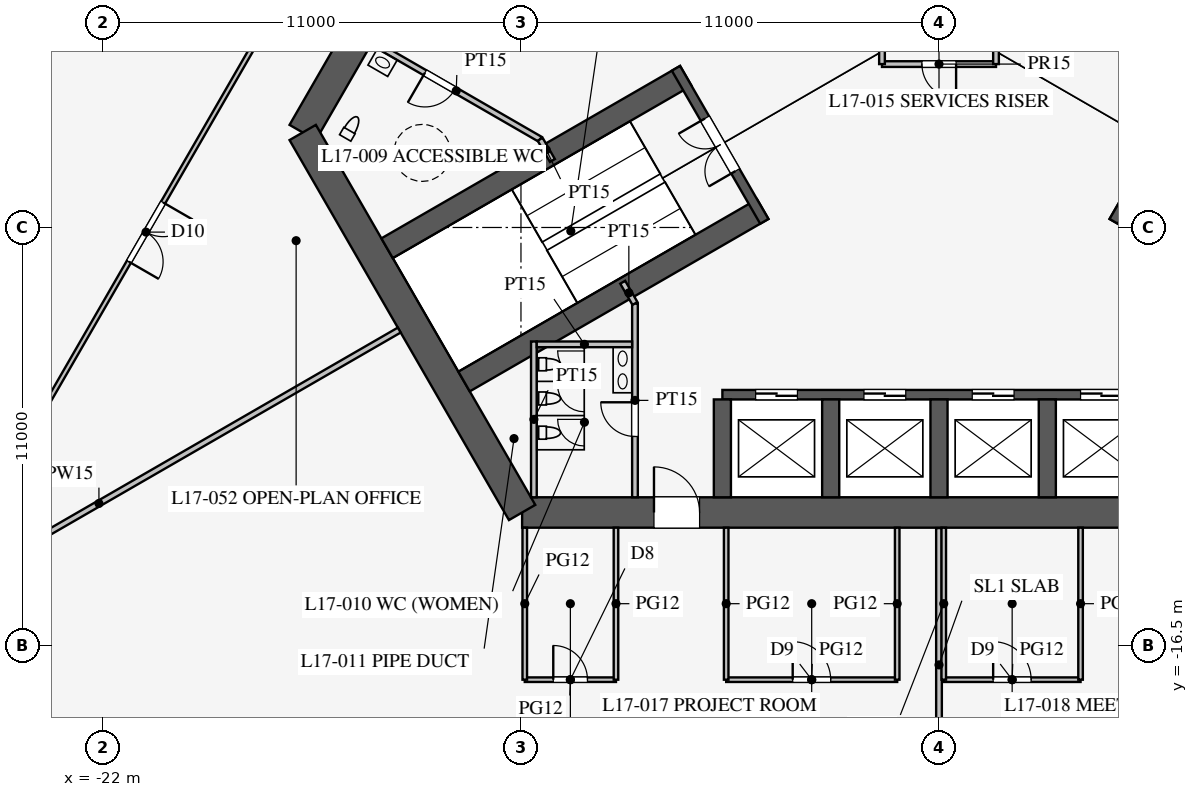
"""IFC4 building model, lengths in metres.
Left out: names, types, materials, properties, quantities, classifications, styles, units other than length and angle.
Written with IfcOpenShell. Run it as: python <this file> out.ifc"""

import sys

from ifc_helpers import new_model, si_unit, direction, frame, frame_2d, origin, place, context, subcontext, project, spatial, rectangle, extrude, element, fill, save


model = new_model("IFC4")
c1 = context("Model", 3, precision=1e-05, world=origin(), true_north=direction((0.0, 1.0)))
c2 = subcontext(c1, "Body", "Model", "MODEL_VIEW")
j1 = project(units=[si_unit("LENGTHUNIT", "METRE"), si_unit("PLANEANGLEUNIT", "RADIAN")], contexts=[c1])
p1 = place(None, origin())
s1 = spatial("IfcSite", under=j1, at=p1, CompositionType="ELEMENT")
p2 = place(p1, origin())
s2 = spatial("IfcBuilding", under=s1, at=p2, CompositionType="ELEMENT")
p3 = place(p2, frame((0.0, 0.0, 75.3)))
s3 = spatial("IfcBuildingStorey", under=s2, at=p3, CompositionType="ELEMENT", Elevation=75.3)
p4 = place(p3, frame((-10.97, -13.0, 0.0), z_axis=(0.0, 0.0, 1.0), x_axis=(1.0, 0.0, 0.0)))
e1 = element("IfcWall", 1, at=p4, inside=s3, PredefinedType="SHEAR", context=c2, shape_type="SweptSolid", body=[
    extrude(rectangle(XDim=21.939, YDim=0.8, at=frame_2d((10.97, 0.0))), origin(), (0.0, 0.0, 1.0), 4.2),
])
p5 = place(p4, frame((17.27, 0.0, 0.0)))
e2 = element("IfcOpeningElement", 2, at=p5, cuts=e1, PredefinedType="OPENING", context=c2, shape_type="SweptSolid", body=[
    extrude(rectangle(XDim=1.2, YDim=2.1, at=frame_2d((0.6, 1.05))), frame((0.0, 0.41, 0.0), z_axis=(0.0, -1.0, 0.0), x_axis=(1.0, 0.0, 0.0)), (0.0, 0.0, 1.0), 0.82),
])
p6 = place(p4, frame((3.47, 0.0, 0.0)))
e3 = element("IfcOpeningElement", 3, at=p6, cuts=e1, PredefinedType="OPENING", context=c2, shape_type="SweptSolid", body=[
    extrude(rectangle(XDim=1.2, YDim=2.1, at=frame_2d((0.6, 1.05))), frame((0.0, 0.41, 0.0), z_axis=(0.0, -1.0, 0.0), x_axis=(1.0, 0.0, 0.0)), (0.0, 0.0, 1.0), 0.82),
])
p7 = place(p3, frame((-5.773, 16.0, 0.0), z_axis=(0.0, 0.0, 1.0), x_axis=(-0.500002442456, -0.866023993627, 0.0)))
e4 = element("IfcWall", 4, at=p7, inside=s3, PredefinedType="SHEAR", context=c2, shape_type="SweptSolid", body=[
    extrude(rectangle(XDim=21.939, YDim=0.8, at=frame_2d((10.97, 0.0))), origin(), (0.0, 0.0, 1.0), 4.2),
])
p8 = place(p7, frame((17.27, 0.0, 0.0)))
e5 = element("IfcOpeningElement", 5, at=p8, cuts=e4, PredefinedType="OPENING", context=c2, shape_type="SweptSolid", body=[
    extrude(rectangle(XDim=1.2, YDim=2.1, at=frame_2d((0.6, 1.05))), frame((0.0, 0.41, 0.0), z_axis=(0.0, -1.0, 0.0), x_axis=(1.0, 0.0, 0.0)), (0.0, 0.0, 1.0), 0.82),
])
p9 = place(p7, frame((3.47, 0.0, 0.0)))
e6 = element("IfcOpeningElement", 6, at=p9, cuts=e4, PredefinedType="OPENING", context=c2, shape_type="SweptSolid", body=[
    extrude(rectangle(XDim=1.2, YDim=2.1, at=frame_2d((0.6, 1.05))), frame((0.0, 0.41, 0.0), z_axis=(0.0, -1.0, 0.0), x_axis=(1.0, 0.0, 0.0)), (0.0, 0.0, 1.0), 0.82),
])
p10 = place(p3, frame((-16.743, -3.0, 0.0), z_axis=(0.0, 0.0, 1.0), x_axis=(0.499995765644, -0.866027848477, 0.0)))
e7 = element("IfcWall", 7, at=p10, inside=s3, PredefinedType="SHEAR", context=c2, shape_type="SweptSolid", body=[
    extrude(rectangle(XDim=11.547, YDim=0.8, at=frame_2d((5.773, 0.0))), origin(), (0.0, 0.0, 1.0), 4.2),
])
p11 = place(p3, frame((-5.7, -9.9, 0.0), z_axis=(0.0, 0.0, 1.0), x_axis=(1.0, 0.0, 0.0)))
e8 = element("IfcWall", 8, at=p11, inside=s3, PredefinedType="SHEAR", context=c2, shape_type="SweptSolid", body=[
    extrude(rectangle(XDim=11.4, YDim=0.25, at=frame_2d((5.7, 0.0))), origin(), (0.0, 0.0, 1.0), 4.2),
])
p12 = place(p11, frame((0.875, 0.0, 0.0)))
e9 = element("IfcOpeningElement", 9, at=p12, cuts=e8, PredefinedType="OPENING", context=c2, shape_type="SweptSolid", body=[
    extrude(rectangle(XDim=1.1, YDim=2.2, at=frame_2d((0.55, 1.1))), frame((0.0, 0.135, 0.0), z_axis=(0.0, -1.0, 0.0), x_axis=(1.0, 0.0, 0.0)), (0.0, 0.0, 1.0), 0.27),
])
p13 = place(p11, frame((3.725, 0.0, 0.0)))
e10 = element("IfcOpeningElement", 10, at=p13, cuts=e8, PredefinedType="OPENING", context=c2, shape_type="SweptSolid", body=[
    extrude(rectangle(XDim=1.1, YDim=2.2, at=frame_2d((0.55, 1.1))), frame((0.0, 0.135, 0.0), z_axis=(0.0, -1.0, 0.0), x_axis=(1.0, 0.0, 0.0)), (0.0, 0.0, 1.0), 0.27),
])
p14 = place(p11, frame((6.575, 0.0, 0.0)))
e11 = element("IfcOpeningElement", 11, at=p14, cuts=e8, PredefinedType="OPENING", context=c2, shape_type="SweptSolid", body=[
    extrude(rectangle(XDim=1.1, YDim=2.2, at=frame_2d((0.55, 1.1))), frame((0.0, 0.135, 0.0), z_axis=(0.0, -1.0, 0.0), x_axis=(1.0, 0.0, 0.0)), (0.0, 0.0, 1.0), 0.27),
])
p15 = place(p11, frame((9.425, 0.0, 0.0)))
e12 = element("IfcOpeningElement", 12, at=p15, cuts=e8, PredefinedType="OPENING", context=c2, shape_type="SweptSolid", body=[
    extrude(rectangle(XDim=1.1, YDim=2.2, at=frame_2d((0.55, 1.1))), frame((0.0, 0.135, 0.0), z_axis=(0.0, -1.0, 0.0), x_axis=(1.0, 0.0, 0.0)), (0.0, 0.0, 1.0), 0.27),
])
for number, where, z_axis, x_axis in (
    (13, (-5.7, -10.025, 0.0), (0.0, 0.0, 1.0), (0.0, -1.0, 0.0)),
    (14, (-2.85, -10.025, 0.0), (0.0, 0.0, 1.0), (0.0, -1.0, 0.0)),
    (15, (0.0, -10.025, 0.0), (0.0, 0.0, 1.0), (0.0, -1.0, 0.0)),
    (16, (2.85, -10.025, 0.0), (0.0, 0.0, 1.0), (0.0, -1.0, 0.0)),
):
    element("IfcWall", number, at=place(p3, frame(where, z_axis=z_axis, x_axis=x_axis)), inside=s3, PredefinedType="SHEAR", context=c2, shape_type="SweptSolid", body=[
        extrude(rectangle(XDim=2.575, YDim=0.45, at=frame_2d((1.288, 0.0))), origin(), (0.0, 0.0, 1.0), 4.2),
    ])
p16 = place(p3, frame((4.638, -5.016, 0.0), z_axis=(0.0, 0.0, 1.0), x_axis=(0.866019375473, -0.500010441196, 0.0)))
e17 = element("IfcWall", 17, at=p16, inside=s3, PredefinedType="SHEAR", context=c2, shape_type="SweptSolid", body=[
    extrude(rectangle(XDim=9.075, YDim=0.6, at=frame_2d((4.538, 0.0))), origin(), (0.0, 0.0, 1.0), 4.2),
])
p17 = place(p3, frame((4.597, -5.339, 0.0), z_axis=(0.0, 0.0, 1.0), x_axis=(0.499984536904, 0.866034331223, 0.0)))
e18 = element("IfcWall", 18, at=p17, inside=s3, PredefinedType="SHEAR", context=c2, shape_type="SweptSolid", body=[
    extrude(rectangle(XDim=4.65, YDim=0.25, at=frame_2d((2.325, 0.0))), origin(), (0.0, 0.0, 1.0), 4.2),
])
p18 = place(p17, frame((1.525, 0.0, 0.0)))
e19 = element("IfcOpeningElement", 19, at=p18, cuts=e18, PredefinedType="OPENING", context=c2, shape_type="SweptSolid", body=[
    extrude(rectangle(XDim=1.6, YDim=2.1, at=frame_2d((0.8, 1.05))), frame((0.0, 0.135, 0.0), z_axis=(0.0, -1.0, 0.0), x_axis=(1.0, 0.0, 0.0)), (0.0, 0.0, 1.0), 0.27),
])
for number, where, z_axis, x_axis in (
    (20, (-6.663, -1.509, 0.0), (0.0, 0.0, 1.0), (-0.866, -0.5, 0.0)),
    (21, (-4.638, -5.016, 0.0), (0.0, 0.0, 1.0), (-0.866, -0.5, 0.0)),
):
    element("IfcWall", number, at=place(p3, frame(where, z_axis=z_axis, x_axis=x_axis)), inside=s3, PredefinedType="SHEAR", context=c2, shape_type="SweptSolid", body=[
        extrude(rectangle(XDim=9.075, YDim=0.6, at=frame_2d((4.538, 0.0))), origin(), (0.0, 0.0, 1.0), 4.2),
    ])
p19 = place(p3, frame((-6.922, -1.312, 0.0), z_axis=(0.0, 0.0, 1.0), x_axis=(0.499984536904, -0.866034331223, 0.0)))
e22 = element("IfcWall", 22, at=p19, inside=s3, PredefinedType="SHEAR", context=c2, shape_type="SweptSolid", body=[
    extrude(rectangle(XDim=4.65, YDim=0.25, at=frame_2d((2.325, 0.0))), origin(), (0.0, 0.0, 1.0), 4.2),
])
p20 = place(p19, frame((1.525, 0.0, 0.0)))
e23 = element("IfcOpeningElement", 23, at=p20, cuts=e22, PredefinedType="OPENING", context=c2, shape_type="SweptSolid", body=[
    extrude(rectangle(XDim=1.6, YDim=2.1, at=frame_2d((0.8, 1.05))), frame((0.0, 0.135, 0.0), z_axis=(0.0, -1.0, 0.0), x_axis=(1.0, 0.0, 0.0)), (0.0, 0.0, 1.0), 0.27),
])
p21 = place(p3, frame((-8.0, -7.5, 0.0), z_axis=(0.0, 0.0, 1.0), x_axis=(0.0, -1.0, 0.0)))
e24 = element("IfcWall", 24, at=p21, inside=s3, PredefinedType="PARTITIONING", context=c2, shape_type="SweptSolid", body=[
    extrude(rectangle(XDim=5.1, YDim=0.15, at=frame_2d((2.55, 0.0))), origin(), (0.0, 0.0, 1.0), 4.0),
])
p22 = place(p21, frame((2.6, 0.0, 0.0)))
e25 = element("IfcOpeningElement", 25, at=p22, cuts=e24, PredefinedType="OPENING", context=c2, shape_type="SweptSolid", body=[
    extrude(rectangle(XDim=0.9, YDim=2.1, at=frame_2d((0.45, 1.05))), frame((0.0, 0.085, 0.0), z_axis=(0.0, -1.0, 0.0), x_axis=(1.0, 0.0, 0.0)), (0.0, 0.0, 1.0), 0.17),
])
p23 = place(p3, frame((-10.495, -3.178, 0.0), z_axis=(0.0, 0.0, 1.0), x_axis=(-0.86602216432, 0.500005610874, 0.0)))
e26 = element("IfcWall", 26, at=p23, inside=s3, PredefinedType="PARTITIONING", context=c2, shape_type="SweptSolid", body=[
    extrude(rectangle(XDim=5.1, YDim=0.15, at=frame_2d((2.55, 0.0))), origin(), (0.0, 0.0, 1.0), 4.0),
])
p24 = place(p23, frame((2.6, 0.0, 0.0)))
e27 = element("IfcOpeningElement", 27, at=p24, cuts=e26, PredefinedType="OPENING", context=c2, shape_type="SweptSolid", body=[
    extrude(rectangle(XDim=0.9, YDim=2.1, at=frame_2d((0.45, 1.05))), frame((0.0, 0.085, 0.0), z_axis=(0.0, -1.0, 0.0), x_axis=(1.0, 0.0, 0.0)), (0.0, 0.0, 1.0), 0.17),
])
for number, where, z_axis, x_axis in (
    (28, (-10.495, -3.178, 0.0), (0.0, 0.0, 1.0), (0.5, -0.866, 0.0)),
    (29, (-8.0, -7.5, 0.0), (0.0, 0.0, 1.0), (-0.5, 0.866, 0.0)),
):
    element("IfcWall", number, at=place(p3, frame(where, z_axis=z_axis, x_axis=x_axis)), inside=s3, PredefinedType="PARTITIONING", context=c2, shape_type="SweptSolid", body=[
        extrude(rectangle(XDim=0.645, YDim=0.15, at=frame_2d((0.323, 0.0))), origin(), (0.0, 0.0, 1.0), 4.0),
    ])
p25 = place(p3, frame((-10.66, -8.5, 0.0), z_axis=(0.0, 0.0, 1.0), x_axis=(0.0, -1.0, 0.0)))
e30 = element("IfcWall", 30, at=p25, inside=s3, PredefinedType="PARTITIONING", context=c2, shape_type="SweptSolid", body=[
    extrude(rectangle(XDim=4.1, YDim=0.15, at=frame_2d((2.05, 0.0))), origin(), (0.0, 0.0, 1.0), 4.0),
])
p26 = place(p3, frame((-8.075, -8.575, 0.0), z_axis=(0.0, 0.0, 1.0), x_axis=(-1.0, 0.0, 0.0)))
e31 = element("IfcWall", 31, at=p26, inside=s3, PredefinedType="PARTITIONING", context=c2, shape_type="SweptSolid", body=[
    extrude(rectangle(XDim=2.51, YDim=0.15, at=frame_2d((1.255, 0.0))), origin(), (0.0, 0.0, 1.0), 4.0),
])
p27 = place(p3, frame((-1.5, -1.2, 0.0), z_axis=(0.0, 0.0, 1.0), x_axis=(1.0, 0.0, 0.0)))
e32 = element("IfcWall", 32, at=p27, inside=s3, PredefinedType="PARTITIONING", context=c2, shape_type="SweptSolid", body=[
    extrude(rectangle(XDim=3.0, YDim=0.15, at=frame_2d((1.5, 0.0))), origin(), (0.0, 0.0, 1.0), 4.0),
])
p28 = place(p27, frame((1.05, 0.0, 0.0)))
e33 = element("IfcOpeningElement", 33, at=p28, cuts=e32, PredefinedType="OPENING", context=c2, shape_type="SweptSolid", body=[
    extrude(rectangle(XDim=0.9, YDim=2.1, at=frame_2d((0.45, 1.05))), frame((0.0, 0.085, 0.0), z_axis=(0.0, -1.0, 0.0), x_axis=(1.0, 0.0, 0.0)), (0.0, 0.0, 1.0), 0.17),
])
for number, where, z_axis, x_axis in (
    (34, (1.5, -1.2, 0.0), (0.0, 0.0, 1.0), (0.0, 1.0, 0.0)),
    (35, (-1.5, 1.2, 0.0), (0.0, 0.0, 1.0), (0.0, -1.0, 0.0)),
):
    element("IfcWall", number, at=place(p3, frame(where, z_axis=z_axis, x_axis=x_axis)), inside=s3, PredefinedType="PARTITIONING", context=c2, shape_type="SweptSolid", body=[
        extrude(rectangle(XDim=2.4, YDim=0.15, at=frame_2d((1.2, 0.0))), origin(), (0.0, 0.0, 1.0), 4.0),
    ])
p29 = place(p3, frame((-14.203, -8.2, 0.0), z_axis=(0.0, 0.0, 1.0), x_axis=(-0.866024965723, -0.500000758745, 0.0)))
e36 = element("IfcWall", 36, at=p29, inside=s3, PredefinedType="PARTITIONING", context=c2, shape_type="SweptSolid", body=[
    extrude(rectangle(XDim=18.25, YDim=0.15, at=frame_2d((9.125, 0.0))), origin(), (0.0, 0.0, 1.0), 2.3),
])
p30 = place(p3, frame((0.0, -13.41, 0.0), z_axis=(0.0, 0.0, 1.0), x_axis=(0.0, -1.0, 0.0)))
e37 = element("IfcWall", 37, at=p30, inside=s3, PredefinedType="PARTITIONING", context=c2, shape_type="SweptSolid", body=[
    extrude(rectangle(XDim=12.709, YDim=0.15, at=frame_2d((6.354, 0.0))), origin(), (0.0, 0.0, 1.0), 2.8),
])
p31 = place(p3, frame((0.125, -17.4, 0.0), z_axis=(0.0, 0.0, 1.0), x_axis=(1.0, 0.0, 0.0)))
e38 = element("IfcWall", 38, at=p31, inside=s3, PredefinedType="PARTITIONING", context=c2, shape_type="SweptSolid", body=[
    extrude(rectangle(XDim=3.6, YDim=0.12, at=frame_2d((1.8, 0.0))), origin(), (0.0, 0.0, 1.0), 2.9),
])
p32 = place(p31, frame((1.3, 0.0, 0.15)))
e39 = element("IfcOpeningElement", 39, at=p32, cuts=e38, PredefinedType="OPENING", context=c2, shape_type="SweptSolid", body=[
    extrude(rectangle(XDim=1.0, YDim=2.1, at=frame_2d((0.5, 1.05))), frame((0.0, 0.07, 0.0), z_axis=(0.0, -1.0, 0.0), x_axis=(1.0, 0.0, 0.0)), (0.0, 0.0, 1.0), 0.14),
])
p33 = place(p3, frame((-10.9, -17.4, 0.0), z_axis=(0.0, 0.0, 1.0), x_axis=(1.0, 0.0, 0.0)))
e40 = element("IfcWall", 40, at=p33, inside=s3, PredefinedType="PARTITIONING", context=c2, shape_type="SweptSolid", body=[
    extrude(rectangle(XDim=2.4, YDim=0.12, at=frame_2d((1.2, 0.0))), origin(), (0.0, 0.0, 1.0), 2.9),
])
p34 = place(p33, frame((0.75, 0.0, 0.15)))
e41 = element("IfcOpeningElement", 41, at=p34, cuts=e40, PredefinedType="OPENING", context=c2, shape_type="SweptSolid", body=[
    extrude(rectangle(XDim=0.9, YDim=2.1, at=frame_2d((0.45, 1.05))), frame((0.0, 0.07, 0.0), z_axis=(0.0, -1.0, 0.0), x_axis=(1.0, 0.0, 0.0)), (0.0, 0.0, 1.0), 0.14),
])
p35 = place(p3, frame((-5.6, -17.4, 0.0), z_axis=(0.0, 0.0, 1.0), x_axis=(1.0, 0.0, 0.0)))
e42 = element("IfcWall", 42, at=p35, inside=s3, PredefinedType="PARTITIONING", context=c2, shape_type="SweptSolid", body=[
    extrude(rectangle(XDim=4.5, YDim=0.12, at=frame_2d((2.25, 0.0))), origin(), (0.0, 0.0, 1.0), 2.9),
])
p36 = place(p35, frame((1.75, 0.0, 0.15)))
e43 = element("IfcOpeningElement", 43, at=p36, cuts=e42, PredefinedType="OPENING", context=c2, shape_type="SweptSolid", body=[
    extrude(rectangle(XDim=1.0, YDim=2.1, at=frame_2d((0.5, 1.05))), frame((0.0, 0.07, 0.0), z_axis=(0.0, -1.0, 0.0), x_axis=(1.0, 0.0, 0.0)), (0.0, 0.0, 1.0), 0.14),
])
p37 = place(p3, frame((0.125, -13.4, 0.0), z_axis=(0.0, 0.0, 1.0), x_axis=(0.0, -1.0, 0.0)))
e44 = element("IfcWall", 44, at=p37, inside=s3, PredefinedType="PARTITIONING", context=c2, shape_type="SweptSolid", body=[
    extrude(rectangle(XDim=4.0, YDim=0.12, at=frame_2d((2.0, 0.0))), origin(), (0.0, 0.0, 1.0), 2.8),
])
for number, where, z_axis, x_axis in (
    (45, (3.725, -13.4, 0.0), (0.0, 0.0, 1.0), (0.0, -1.0, 0.0)),
    (46, (-1.1, -13.4, 0.0), (0.0, 0.0, 1.0), (0.0, -1.0, 0.0)),
    (47, (-10.9, -13.4, 0.0), (0.0, 0.0, 1.0), (0.0, -1.0, 0.0)),
    (48, (-5.6, -13.4, 0.0), (0.0, 0.0, 1.0), (0.0, -1.0, 0.0)),
    (49, (-8.5, -13.4, 0.0), (0.0, 0.0, 1.0), (0.0, -1.0, 0.0)),
):
    element("IfcWall", number, at=place(p3, frame(where, z_axis=z_axis, x_axis=x_axis)), inside=s3, PredefinedType="PARTITIONING", context=c2, shape_type="SweptSolid", body=[
        extrude(rectangle(XDim=4.0, YDim=0.12, at=frame_2d((2.0, 0.0))), origin(), (0.0, 0.0, 1.0), 2.9),
    ])
p38 = place(p3, frame((26.415, -15.231, 0.0), z_axis=(0.0, 0.0, 1.0), x_axis=(-0.50000091641, 0.866024874695, 0.0)))
e50 = element("IfcWall", 50, at=p38, inside=s3, PredefinedType="PARTITIONING", context=c2, shape_type="SweptSolid", body=[
    extrude(rectangle(XDim=52.796, YDim=0.12, at=frame_2d((26.398, 0.0))), origin(), (0.0, 0.0, 1.0), 2.9),
])
p39 = place(p38, frame((10.2, 0.0, 0.15)))
e51 = element("IfcOpeningElement", 51, at=p39, cuts=e50, PredefinedType="OPENING", context=c2, shape_type="SweptSolid", body=[
    extrude(rectangle(XDim=1.8, YDim=2.1, at=frame_2d((0.9, 1.05))), frame((0.0, 0.07, 0.0), z_axis=(0.0, -1.0, 0.0), x_axis=(1.0, 0.0, 0.0)), (0.0, 0.0, 1.0), 0.14),
])
p40 = place(p38, frame((40.8, 0.0, 0.15)))
e52 = element("IfcOpeningElement", 52, at=p40, cuts=e50, PredefinedType="OPENING", context=c2, shape_type="SweptSolid", body=[
    extrude(rectangle(XDim=1.8, YDim=2.1, at=frame_2d((0.9, 1.05))), frame((0.0, 0.07, 0.0), z_axis=(0.0, -1.0, 0.0), x_axis=(1.0, 0.0, 0.0)), (0.0, 0.0, 1.0), 0.14),
])
p41 = place(p3, frame((-0.016, 30.491, 0.0), z_axis=(0.0, 0.0, 1.0), x_axis=(-0.50000091641, -0.866024874695, 0.0)))
e53 = element("IfcWall", 53, at=p41, inside=s3, PredefinedType="PARTITIONING", context=c2, shape_type="SweptSolid", body=[
    extrude(rectangle(XDim=52.796, YDim=0.12, at=frame_2d((26.398, 0.0))), origin(), (0.0, 0.0, 1.0), 2.9),
])
p42 = place(p41, frame((10.2, 0.0, 0.15)))
e54 = element("IfcOpeningElement", 54, at=p42, cuts=e53, PredefinedType="OPENING", context=c2, shape_type="SweptSolid", body=[
    extrude(rectangle(XDim=1.8, YDim=2.1, at=frame_2d((0.9, 1.05))), frame((0.0, 0.07, 0.0), z_axis=(0.0, -1.0, 0.0), x_axis=(1.0, 0.0, 0.0)), (0.0, 0.0, 1.0), 0.14),
])
p43 = place(p41, frame((40.8, 0.0, 0.15)))
e55 = element("IfcOpeningElement", 55, at=p43, cuts=e53, PredefinedType="OPENING", context=c2, shape_type="SweptSolid", body=[
    extrude(rectangle(XDim=1.8, YDim=2.1, at=frame_2d((0.9, 1.05))), frame((0.0, 0.07, 0.0), z_axis=(0.0, -1.0, 0.0), x_axis=(1.0, 0.0, 0.0)), (0.0, 0.0, 1.0), 0.14),
])
p44 = place(p22, frame((0.9, 0.0, 0.0), z_axis=(0.0, 0.0, 1.0), x_axis=(-1.0, 0.0, 0.0)))
e56 = element("IfcDoor", 56, at=p44, inside=s3, OperationType="SINGLE_SWING_RIGHT", PredefinedType="DOOR", context=c2, shape_type="SweptSolid", body=[
    extrude(rectangle(XDim=0.9, YDim=2.1, at=frame_2d((0.45, 1.05))), frame((0.0, 0.025, 0.0), z_axis=(0.0, -1.0, 0.0), x_axis=(1.0, 0.0, 0.0)), (0.0, 0.0, 1.0), 0.05),
])
fill(e25, e56)
p45 = place(p24, origin())
e57 = element("IfcDoor", 57, at=p45, inside=s3, OperationType="SINGLE_SWING_RIGHT", PredefinedType="DOOR", context=c2, shape_type="SweptSolid", body=[
    extrude(rectangle(XDim=0.9, YDim=2.1, at=frame_2d((0.45, 1.05))), frame((0.0, 0.025, 0.0), z_axis=(0.0, -1.0, 0.0), x_axis=(1.0, 0.0, 0.0)), (0.0, 0.0, 1.0), 0.05),
])
fill(e27, e57)
p46 = place(p28, frame((0.9, 0.0, 0.0), z_axis=(0.0, 0.0, 1.0), x_axis=(-1.0, 0.0, 0.0)))
e58 = element("IfcDoor", 58, at=p46, inside=s3, OperationType="SINGLE_SWING_LEFT", PredefinedType="DOOR", context=c2, shape_type="SweptSolid", body=[
    extrude(rectangle(XDim=0.9, YDim=2.1, at=frame_2d((0.45, 1.05))), frame((0.0, 0.025, 0.0), z_axis=(0.0, -1.0, 0.0), x_axis=(1.0, 0.0, 0.0)), (0.0, 0.0, 1.0), 0.05),
])
fill(e33, e58)
p47 = place(p20, frame((1.6, 0.0, 0.0), z_axis=(0.0, 0.0, 1.0), x_axis=(-1.0, 0.0, 0.0)))
e59 = element("IfcDoor", 59, at=p47, inside=s3, OperationType="DOUBLE_DOOR_SINGLE_SWING", PredefinedType="DOOR", context=c2, shape_type="SweptSolid", body=[
    extrude(rectangle(XDim=1.6, YDim=2.1, at=frame_2d((0.8, 1.05))), frame((0.0, 0.025, 0.0), z_axis=(0.0, -1.0, 0.0), x_axis=(1.0, 0.0, 0.0)), (0.0, 0.0, 1.0), 0.05),
])
fill(e23, e59)
p48 = place(p6, origin())
e60 = element("IfcDoor", 60, at=p48, inside=s3, OperationType="SINGLE_SWING_LEFT", PredefinedType="DOOR", context=c2, shape_type="SweptSolid", body=[
    extrude(rectangle(XDim=1.2, YDim=2.1, at=frame_2d((0.6, 1.05))), frame((0.0, 0.025, 0.0), z_axis=(0.0, -1.0, 0.0), x_axis=(1.0, 0.0, 0.0)), (0.0, 0.0, 1.0), 0.05),
])
fill(e3, e60)
p49 = place(p36, origin())
e61 = element("IfcDoor", 61, at=p49, inside=s3, OperationType="SINGLE_SWING_LEFT", PredefinedType="DOOR", context=c2, shape_type="SweptSolid", body=[
    extrude(rectangle(XDim=1.0, YDim=2.1, at=frame_2d((0.5, 1.05))), frame((0.0, 0.025, 0.0), z_axis=(0.0, -1.0, 0.0), x_axis=(1.0, 0.0, 0.0)), (0.0, 0.0, 1.0), 0.05),
])
fill(e43, e61)
p50 = place(p32, origin())
e62 = element("IfcDoor", 62, at=p50, inside=s3, OperationType="SINGLE_SWING_LEFT", PredefinedType="DOOR", context=c2, shape_type="SweptSolid", body=[
    extrude(rectangle(XDim=1.0, YDim=2.1, at=frame_2d((0.5, 1.05))), frame((0.0, 0.025, 0.0), z_axis=(0.0, -1.0, 0.0), x_axis=(1.0, 0.0, 0.0)), (0.0, 0.0, 1.0), 0.05),
])
fill(e39, e62)
p51 = place(p34, origin())
e63 = element("IfcDoor", 63, at=p51, inside=s3, OperationType="SINGLE_SWING_LEFT", PredefinedType="DOOR", context=c2, shape_type="SweptSolid", body=[
    extrude(rectangle(XDim=0.9, YDim=2.1, at=frame_2d((0.45, 1.05))), frame((0.0, 0.025, 0.0), z_axis=(0.0, -1.0, 0.0), x_axis=(1.0, 0.0, 0.0)), (0.0, 0.0, 1.0), 0.05),
])
fill(e41, e63)
p52 = place(p43, origin())
e64 = element("IfcDoor", 64, at=p52, inside=s3, OperationType="DOUBLE_DOOR_SINGLE_SWING", PredefinedType="DOOR", context=c2, shape_type="SweptSolid", body=[
    extrude(rectangle(XDim=1.8, YDim=2.1, at=frame_2d((0.9, 1.05))), frame((0.0, 0.025, 0.0), z_axis=(0.0, -1.0, 0.0), x_axis=(1.0, 0.0, 0.0)), (0.0, 0.0, 1.0), 0.05),
])
fill(e55, e64)
p53 = place(p12, origin())
e65 = element("IfcDoor", 65, at=p53, inside=s3, OperationType="DOUBLE_DOOR_SLIDING", PredefinedType="DOOR", context=c2, shape_type="SweptSolid", body=[
    extrude(rectangle(XDim=1.1, YDim=2.2, at=frame_2d((0.55, 1.1))), frame((0.0, 0.025, 0.0), z_axis=(0.0, -1.0, 0.0), x_axis=(1.0, 0.0, 0.0)), (0.0, 0.0, 1.0), 0.05),
])
fill(e9, e65)
p54 = place(p13, origin())
e66 = element("IfcDoor", 66, at=p54, inside=s3, OperationType="DOUBLE_DOOR_SLIDING", PredefinedType="DOOR", context=c2, shape_type="SweptSolid", body=[
    extrude(rectangle(XDim=1.1, YDim=2.2, at=frame_2d((0.55, 1.1))), frame((0.0, 0.025, 0.0), z_axis=(0.0, -1.0, 0.0), x_axis=(1.0, 0.0, 0.0)), (0.0, 0.0, 1.0), 0.05),
])
fill(e10, e66)
p55 = place(p14, origin())
e67 = element("IfcDoor", 67, at=p55, inside=s3, OperationType="DOUBLE_DOOR_SLIDING", PredefinedType="DOOR", context=c2, shape_type="SweptSolid", body=[
    extrude(rectangle(XDim=1.1, YDim=2.2, at=frame_2d((0.55, 1.1))), frame((0.0, 0.025, 0.0), z_axis=(0.0, -1.0, 0.0), x_axis=(1.0, 0.0, 0.0)), (0.0, 0.0, 1.0), 0.05),
])
fill(e11, e67)
p56 = place(p15, origin())
e68 = element("IfcDoor", 68, at=p56, inside=s3, OperationType="DOUBLE_DOOR_SLIDING", PredefinedType="DOOR", context=c2, shape_type="SweptSolid", body=[
    extrude(rectangle(XDim=1.1, YDim=2.2, at=frame_2d((0.55, 1.1))), frame((0.0, 0.025, 0.0), z_axis=(0.0, -1.0, 0.0), x_axis=(1.0, 0.0, 0.0)), (0.0, 0.0, 1.0), 0.05),
])
fill(e12, e68)
save(model, sys.argv[1])
